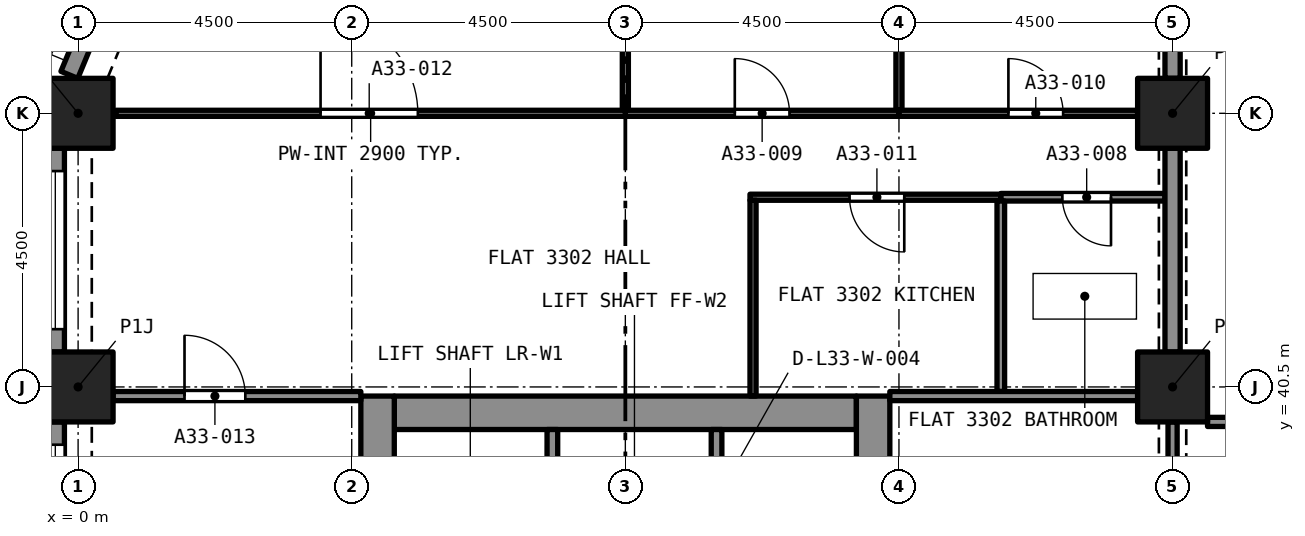
"""IFC4 building model, lengths in metres.
Left out: names, types, materials, properties, quantities, classifications, styles, units other than length and angle.
Written with IfcOpenShell. Run it as: python <this file> out.ifc"""

import sys

from ifc_helpers import new_model, si_unit, direction, frame, frame_2d, origin, origin_2d, place, context, subcontext, project, spatial, rectangle, extrude, element, fill, save


model = new_model("IFC4")
c1 = context("Model", 3, precision=1e-05, world=origin(), true_north=direction((0.0, 1.0)))
c2 = subcontext(c1, "Body", "Model", "MODEL_VIEW")
j1 = project(units=[si_unit("LENGTHUNIT", "METRE"), si_unit("PLANEANGLEUNIT", "RADIAN")], contexts=[c1])
p1 = place(None, origin())
s1 = spatial("IfcSite", under=j1, at=p1, CompositionType="ELEMENT")
p2 = place(p1, origin())
s2 = spatial("IfcBuilding", under=s1, at=p2, CompositionType="ELEMENT")
p3 = place(p2, frame((0.0, 0.0, 118.4)))
s3 = spatial("IfcBuildingStorey", under=s2, at=p3, CompositionType="ELEMENT", Elevation=118.4)
for number, where, z_axis, x_axis in (
    (1, (0.0, 40.5, 0.0), (0.0, 0.0, 1.0), (1.0, 0.0, 0.0)),
    (2, (18.0, 40.5, 0.0), (0.0, 0.0, 1.0), (1.0, 0.0, 0.0)),
    (3, (0.0, 45.0, 0.0), (0.0, 0.0, 1.0), (1.0, 0.0, 0.0)),
    (4, (18.0, 45.0, 0.0), (0.0, 0.0, 1.0), (1.0, 0.0, 0.0)),
):
    element("IfcColumn", number, at=place(p3, frame(where, z_axis=z_axis, x_axis=x_axis)), inside=s3, PredefinedType="COLUMN", context=c2, shape_type="SweptSolid", body=[
        extrude(rectangle(XDim=1.15, YDim=1.15, at=origin_2d()), origin(), (0.0, 0.0, 1.0), 3.2),
    ])
p4 = place(p3, frame((5.2, 40.075, 0.0), z_axis=(0.0, 0.0, 1.0), x_axis=(1.0, 0.0, 0.0)))
e5 = element("IfcWall", 5, at=p4, inside=s3, PredefinedType="SOLIDWALL", context=c2, shape_type="SweptSolid", body=[
    extrude(rectangle(XDim=7.6, YDim=0.55, at=frame_2d((3.8, 0.0))), origin(), (0.0, 0.0, 1.0), 3.2),
])
p5 = place(p3, frame((4.925, 27.15, 0.0), z_axis=(0.0, 0.0, 1.0), x_axis=(0.0, 1.0, 0.0)))
e6 = element("IfcWall", 6, at=p5, inside=s3, PredefinedType="SOLIDWALL", context=c2, shape_type="SweptSolid", body=[
    extrude(rectangle(XDim=13.2, YDim=0.55, at=frame_2d((6.6, 0.0))), origin(), (0.0, 0.0, 1.0), 3.2),
])
p6 = place(p5, frame((8.8, 0.0, 0.0)))
e7 = element("IfcOpeningElement", 7, at=p6, cuts=e6, PredefinedType="OPENING", context=c2, shape_type="SweptSolid", body=[
    extrude(rectangle(XDim=1.2, YDim=2.1, at=frame_2d((0.6, 1.05))), frame((0.0, 0.285, 0.0), z_axis=(0.0, -1.0, 0.0), x_axis=(1.0, 0.0, 0.0)), (0.0, 0.0, 1.0), 0.57),
])
p7 = place(p3, frame((13.075, 27.15, 0.0), z_axis=(0.0, 0.0, 1.0), x_axis=(0.0, 1.0, 0.0)))
e8 = element("IfcWall", 8, at=p7, inside=s3, PredefinedType="SOLIDWALL", context=c2, shape_type="SweptSolid", body=[
    extrude(rectangle(XDim=13.2, YDim=0.55, at=frame_2d((6.6, 0.0))), origin(), (0.0, 0.0, 1.0), 3.2),
])
p8 = place(p7, frame((10.95, 0.0, 0.0)))
e9 = element("IfcOpeningElement", 9, at=p8, cuts=e8, PredefinedType="OPENING", context=c2, shape_type="SweptSolid", body=[
    extrude(rectangle(XDim=1.1, YDim=2.1, at=frame_2d((0.55, 1.05))), frame((0.0, 0.285, 0.0), z_axis=(0.0, -1.0, 0.0), x_axis=(1.0, 0.0, 0.0)), (0.0, 0.0, 1.0), 0.57),
])
p9 = place(p7, frame((8.8, 0.0, 0.0)))
e10 = element("IfcOpeningElement", 10, at=p9, cuts=e8, PredefinedType="OPENING", context=c2, shape_type="SweptSolid", body=[
    extrude(rectangle(XDim=1.2, YDim=2.1, at=frame_2d((0.6, 1.05))), frame((0.0, 0.285, 0.0), z_axis=(0.0, -1.0, 0.0), x_axis=(1.0, 0.0, 0.0)), (0.0, 0.0, 1.0), 0.57),
])
p10 = place(p3, frame((-0.144, 45.632, 0.0), z_axis=(0.0, 0.0, 1.0), x_axis=(0.382723818695, 0.923862802911, 0.0)))
e11 = element("IfcWall", 11, at=p10, inside=s3, PredefinedType="SOLIDWALL", context=c2, shape_type="SweptSolid", body=[
    extrude(rectangle(XDim=2.164, YDim=0.3, at=frame_2d((1.082, 0.0))), origin(), (0.0, 0.0, 1.0), 3.2),
])
p11 = place(p10, frame((0.493, 0.0, 0.45)))
e12 = element("IfcOpeningElement", 12, at=p11, cuts=e11, PredefinedType="OPENING", context=c2, shape_type="SweptSolid", body=[
    extrude(rectangle(XDim=1.4, YDim=1.95, at=frame_2d((0.7, 0.975))), frame((0.0, 0.16, 0.0), z_axis=(0.0, -1.0, 0.0), x_axis=(1.0, 0.0, 0.0)), (0.0, 0.0, 1.0), 0.32),
])
p12 = place(p3, frame((-0.375, 41.075, 0.0), z_axis=(0.0, 0.0, 1.0), x_axis=(0.0, 1.0, 0.0)))
e13 = element("IfcWall", 13, at=p12, inside=s3, PredefinedType="SOLIDWALL", context=c2, shape_type="SweptSolid", body=[
    extrude(rectangle(XDim=3.35, YDim=0.3, at=frame_2d((1.675, 0.0))), origin(), (0.0, 0.0, 1.0), 3.2),
])
p13 = place(p12, frame((0.375, 0.0, 0.45)))
e14 = element("IfcOpeningElement", 14, at=p13, cuts=e13, PredefinedType="OPENING", context=c2, shape_type="SweptSolid", body=[
    extrude(rectangle(XDim=2.6, YDim=1.95, at=frame_2d((1.3, 0.975))), frame((0.0, 0.16, 0.0), z_axis=(0.0, -1.0, 0.0), x_axis=(1.0, 0.0, 0.0)), (0.0, 0.0, 1.0), 0.32),
])
p14 = place(p3, frame((-0.375, 36.575, 0.0), z_axis=(0.0, 0.0, 1.0), x_axis=(0.0, 1.0, 0.0)))
e15 = element("IfcWall", 15, at=p14, inside=s3, PredefinedType="SOLIDWALL", context=c2, shape_type="SweptSolid", body=[
    extrude(rectangle(XDim=3.35, YDim=0.3, at=frame_2d((1.675, 0.0))), origin(), (0.0, 0.0, 1.0), 3.2),
])
p15 = place(p14, frame((0.375, 0.0, 0.45)))
e16 = element("IfcOpeningElement", 16, at=p15, cuts=e15, PredefinedType="OPENING", context=c2, shape_type="SweptSolid", body=[
    extrude(rectangle(XDim=2.6, YDim=1.95, at=frame_2d((1.3, 0.975))), frame((0.0, 0.16, 0.0), z_axis=(0.0, -1.0, 0.0), x_axis=(1.0, 0.0, 0.0)), (0.0, 0.0, 1.0), 0.32),
])
p16 = place(p3, frame((17.875, 43.62, 0.0), z_axis=(0.0, 0.0, 1.0), x_axis=(-1.0, 0.0, 0.0)))
e17 = element("IfcWall", 17, at=p16, inside=s3, PredefinedType="PARTITIONING", context=c2, shape_type="SweptSolid", body=[
    extrude(rectangle(XDim=2.7, YDim=0.125, at=frame_2d((1.35, 0.0))), origin(), (0.0, 0.0, 1.0), 2.9),
])
p17 = place(p16, frame((0.888, 0.0, 0.0)))
e18 = element("IfcOpeningElement", 18, at=p17, cuts=e17, PredefinedType="OPENING", context=c2, shape_type="SweptSolid", body=[
    extrude(rectangle(XDim=0.8, YDim=2.1, at=frame_2d((0.4, 1.05))), frame((0.0, 0.073, 0.0), z_axis=(0.0, -1.0, 0.0), x_axis=(1.0, 0.0, 0.0)), (0.0, 0.0, 1.0), 0.145),
])
p18 = place(p3, frame((15.175, 40.425, 0.0), z_axis=(0.0, 0.0, 1.0), x_axis=(0.0, 1.0, 0.0)))
e19 = element("IfcWall", 19, at=p18, inside=s3, PredefinedType="PARTITIONING", context=c2, shape_type="SweptSolid", body=[
    extrude(rectangle(XDim=3.133, YDim=0.125, at=frame_2d((1.566, 0.0))), origin(), (0.0, 0.0, 1.0), 2.9),
])
p19 = place(p3, frame((18.0, 41.075, 0.0), z_axis=(0.0, 0.0, 1.0), x_axis=(0.0, 1.0, 0.0)))
e20 = element("IfcWall", 20, at=p19, inside=s3, PredefinedType="PARTITIONING", context=c2, shape_type="SweptSolid", body=[
    extrude(rectangle(XDim=3.35, YDim=0.25, at=frame_2d((1.675, 0.0))), origin(), (0.0, 0.0, 1.0), 2.38),
])
p20 = place(p3, frame((13.5, 45.05, 0.0), z_axis=(0.0, 0.0, 1.0), x_axis=(0.0, 1.0, 0.0)))
e21 = element("IfcWall", 21, at=p20, inside=s3, PredefinedType="PARTITIONING", context=c2, shape_type="SweptSolid", body=[
    extrude(rectangle(XDim=3.875, YDim=0.1, at=frame_2d((1.938, 0.0))), origin(), (0.0, 0.0, 1.0), 2.9),
])
p21 = place(p3, frame((9.0, 45.0, 0.0), z_axis=(0.0, 0.0, 1.0), x_axis=(1.0, 0.0, 0.0)))
e22 = element("IfcWall", 22, at=p21, inside=s3, PredefinedType="PARTITIONING", context=c2, shape_type="SweptSolid", body=[
    extrude(rectangle(XDim=4.5, YDim=0.1, at=frame_2d((2.25, 0.0))), origin(), (0.0, 0.0, 1.0), 2.9),
])
p22 = place(p21, frame((1.8, 0.0, 0.0)))
e23 = element("IfcOpeningElement", 23, at=p22, cuts=e22, PredefinedType="OPENING", context=c2, shape_type="SweptSolid", body=[
    extrude(rectangle(XDim=0.9, YDim=2.1, at=frame_2d((0.45, 1.05))), frame((0.0, 0.06, 0.0), z_axis=(0.0, -1.0, 0.0), x_axis=(1.0, 0.0, 0.0)), (0.0, 0.0, 1.0), 0.12),
])
p23 = place(p3, frame((9.0, 45.05, 0.0), z_axis=(0.0, 0.0, 1.0), x_axis=(0.0, 1.0, 0.0)))
e24 = element("IfcWall", 24, at=p23, inside=s3, PredefinedType="PARTITIONING", context=c2, shape_type="SweptSolid", body=[
    extrude(rectangle(XDim=3.875, YDim=0.1, at=frame_2d((1.938, 0.0))), origin(), (0.0, 0.0, 1.0), 2.9),
])
p24 = place(p3, frame((13.5, 45.0, 0.0), z_axis=(0.0, 0.0, 1.0), x_axis=(1.0, 0.0, 0.0)))
e25 = element("IfcWall", 25, at=p24, inside=s3, PredefinedType="PARTITIONING", context=c2, shape_type="SweptSolid", body=[
    extrude(rectangle(XDim=3.925, YDim=0.1, at=frame_2d((1.962, 0.0))), origin(), (0.0, 0.0, 1.0), 2.9),
])
p25 = place(p24, frame((1.8, 0.0, 0.0)))
e26 = element("IfcOpeningElement", 26, at=p25, cuts=e25, PredefinedType="OPENING", context=c2, shape_type="SweptSolid", body=[
    extrude(rectangle(XDim=0.9, YDim=2.1, at=frame_2d((0.45, 1.05))), frame((0.0, 0.06, 0.0), z_axis=(0.0, -1.0, 0.0), x_axis=(1.0, 0.0, 0.0)), (0.0, 0.0, 1.0), 0.12),
])
p26 = place(p3, frame((18.0, 45.575, 0.0), z_axis=(0.0, 0.0, 1.0), x_axis=(0.0, 1.0, 0.0)))
e27 = element("IfcWall", 27, at=p26, inside=s3, PredefinedType="PARTITIONING", context=c2, shape_type="SweptSolid", body=[
    extrude(rectangle(XDim=3.35, YDim=0.25, at=frame_2d((1.675, 0.0))), origin(), (0.0, 0.0, 1.0), 2.38),
])
p27 = place(p3, frame((15.175, 43.62, 0.0), z_axis=(0.0, 0.0, 1.0), x_axis=(-1.0, 0.0, 0.0)))
e28 = element("IfcWall", 28, at=p27, inside=s3, PredefinedType="PARTITIONING", context=c2, shape_type="SweptSolid", body=[
    extrude(rectangle(XDim=4.125, YDim=0.1, at=frame_2d((2.062, 0.0))), origin(), (0.0, 0.0, 1.0), 2.9),
])
p28 = place(p27, frame((1.587, 0.0, 0.0)))
e29 = element("IfcOpeningElement", 29, at=p28, cuts=e28, PredefinedType="OPENING", context=c2, shape_type="SweptSolid", body=[
    extrude(rectangle(XDim=0.9, YDim=2.1, at=frame_2d((0.45, 1.05))), frame((0.0, 0.06, 0.0), z_axis=(0.0, -1.0, 0.0), x_axis=(1.0, 0.0, 0.0)), (0.0, 0.0, 1.0), 0.12),
])
p29 = place(p3, frame((11.1, 40.35, 0.0), z_axis=(0.0, 0.0, 1.0), x_axis=(0.0, 1.0, 0.0)))
e30 = element("IfcWall", 30, at=p29, inside=s3, PredefinedType="PARTITIONING", context=c2, shape_type="SweptSolid", body=[
    extrude(rectangle(XDim=3.22, YDim=0.1, at=frame_2d((1.61, 0.0))), origin(), (0.0, 0.0, 1.0), 2.9),
])
p30 = place(p3, frame((0.622, 45.0, 0.0), z_axis=(0.0, 0.0, 1.0), x_axis=(1.0, 0.0, 0.0)))
e31 = element("IfcWall", 31, at=p30, inside=s3, PredefinedType="PARTITIONING", context=c2, shape_type="SweptSolid", body=[
    extrude(rectangle(XDim=8.378, YDim=0.1, at=frame_2d((4.189, 0.0))), origin(), (0.0, 0.0, 1.0), 2.9),
])
p31 = place(p30, frame((3.365, 0.0, 0.0)))
e32 = element("IfcOpeningElement", 32, at=p31, cuts=e31, PredefinedType="OPENING", context=c2, shape_type="SweptSolid", body=[
    extrude(rectangle(XDim=1.6, YDim=2.1, at=frame_2d((0.8, 1.05))), frame((0.0, 0.06, 0.0), z_axis=(0.0, -1.0, 0.0), x_axis=(1.0, 0.0, 0.0)), (0.0, 0.0, 1.0), 0.12),
])
p32 = place(p3, frame((0.575, 40.35, 0.0), z_axis=(0.0, 0.0, 1.0), x_axis=(1.0, 0.0, 0.0)))
e33 = element("IfcWall", 33, at=p32, inside=s3, PredefinedType="PARTITIONING", context=c2, shape_type="SweptSolid", body=[
    extrude(rectangle(XDim=4.075, YDim=0.15, at=frame_2d((2.038, 0.0))), origin(), (0.0, 0.0, 1.0), 2.9),
])
p33 = place(p32, frame((1.175, 0.0, 0.0)))
e34 = element("IfcOpeningElement", 34, at=p33, cuts=e33, PredefinedType="OPENING", context=c2, shape_type="SweptSolid", body=[
    extrude(rectangle(XDim=1.0, YDim=2.1, at=frame_2d((0.5, 1.05))), frame((0.0, 0.085, 0.0), z_axis=(0.0, -1.0, 0.0), x_axis=(1.0, 0.0, 0.0)), (0.0, 0.0, 1.0), 0.17),
])
p34 = place(p3, frame((13.35, 40.35, 0.0), z_axis=(0.0, 0.0, 1.0), x_axis=(1.0, 0.0, 0.0)))
e35 = element("IfcWall", 35, at=p34, inside=s3, PredefinedType="PARTITIONING", context=c2, shape_type="SweptSolid", body=[
    extrude(rectangle(XDim=4.075, YDim=0.15, at=frame_2d((2.038, 0.0))), origin(), (0.0, 0.0, 1.0), 2.9),
])
p35 = place(p3, frame((18.575, 39.925, 0.0), z_axis=(0.0, 0.0, 1.0), x_axis=(1.0, 0.0, 0.0)))
e36 = element("IfcWall", 36, at=p35, inside=s3, PredefinedType="PARTITIONING", context=c2, shape_type="SweptSolid", body=[
    extrude(rectangle(XDim=8.425, YDim=0.15, at=frame_2d((4.212, 0.0))), origin(), (0.0, 0.0, 1.0), 2.75),
])
p36 = place(p35, frame((3.425, 0.0, 0.0)))
e37 = element("IfcOpeningElement", 37, at=p36, cuts=e36, PredefinedType="OPENING", context=c2, shape_type="SweptSolid", body=[
    extrude(rectangle(XDim=1.0, YDim=2.1, at=frame_2d((0.5, 1.05))), frame((0.0, 0.085, 0.0), z_axis=(0.0, -1.0, 0.0), x_axis=(1.0, 0.0, 0.0)), (0.0, 0.0, 1.0), 0.17),
])
p37 = place(p3, frame((18.0, 39.925, 0.0), z_axis=(0.0, 0.0, 1.0), x_axis=(0.0, -1.0, 0.0)))
e38 = element("IfcWall", 38, at=p37, inside=s3, PredefinedType="PARTITIONING", context=c2, shape_type="SweptSolid", body=[
    extrude(rectangle(XDim=3.35, YDim=0.15, at=frame_2d((1.675, 0.0))), origin(), (0.0, 0.0, 1.0), 2.38),
])
p38 = place(p37, frame((1.075, 0.0, 0.0)))
e39 = element("IfcOpeningElement", 39, at=p38, cuts=e38, PredefinedType="OPENING", context=c2, shape_type="SweptSolid", body=[
    extrude(rectangle(XDim=1.2, YDim=2.1, at=frame_2d((0.6, 1.05))), frame((0.0, 0.085, 0.0), z_axis=(0.0, -1.0, 0.0), x_axis=(1.0, 0.0, 0.0)), (0.0, 0.0, 1.0), 0.17),
])
p39 = place(p3, frame((7.8, 37.5, 0.0), z_axis=(0.0, 0.0, 1.0), x_axis=(0.0, 1.0, 0.0)))
e40 = element("IfcWall", 40, at=p39, inside=s3, PredefinedType="SOLIDWALL", context=c2, shape_type="SweptSolid", body=[
    extrude(rectangle(XDim=2.3, YDim=0.175, at=frame_2d((1.15, 0.0))), origin(), (0.0, 0.0, 1.0), 2.9),
])
p40 = place(p3, frame((10.5, 37.5, 0.0), z_axis=(0.0, 0.0, 1.0), x_axis=(0.0, 1.0, 0.0)))
e41 = element("IfcWall", 41, at=p40, inside=s3, PredefinedType="SOLIDWALL", context=c2, shape_type="SweptSolid", body=[
    extrude(rectangle(XDim=2.3, YDim=0.175, at=frame_2d((1.15, 0.0))), origin(), (0.0, 0.0, 1.0), 2.9),
])
p41 = place(p40, frame((0.65, 0.0, 0.0)))
e42 = element("IfcOpeningElement", 42, at=p41, cuts=e41, PredefinedType="OPENING", context=c2, shape_type="SweptSolid", body=[
    extrude(rectangle(XDim=1.0, YDim=2.1, at=frame_2d((0.5, 1.05))), frame((0.0, 0.097, 0.0), z_axis=(0.0, -1.0, 0.0), x_axis=(1.0, 0.0, 0.0)), (0.0, 0.0, 1.0), 0.195),
])
p42 = place(p13, origin())
e43 = element("IfcWindow", 43, at=p42, inside=s3, PartitioningType="SINGLE_PANEL", PredefinedType="WINDOW", context=c2, shape_type="SweptSolid", body=[
    extrude(rectangle(XDim=2.6, YDim=1.95, at=frame_2d((1.3, 0.975))), frame((0.0, 0.03, 0.0), z_axis=(0.0, -1.0, 0.0), x_axis=(1.0, 0.0, 0.0)), (0.0, 0.0, 1.0), 0.06),
])
fill(e14, e43)
p43 = place(p15, origin())
e44 = element("IfcWindow", 44, at=p43, inside=s3, PartitioningType="SINGLE_PANEL", PredefinedType="WINDOW", context=c2, shape_type="SweptSolid", body=[
    extrude(rectangle(XDim=2.6, YDim=1.95, at=frame_2d((1.3, 0.975))), frame((0.0, 0.03, 0.0), z_axis=(0.0, -1.0, 0.0), x_axis=(1.0, 0.0, 0.0)), (0.0, 0.0, 1.0), 0.06),
])
fill(e16, e44)
p44 = place(p17, origin())
e45 = element("IfcDoor", 45, at=p44, inside=s3, OperationType="SINGLE_SWING_LEFT", PredefinedType="DOOR", context=c2, shape_type="SweptSolid", body=[
    extrude(rectangle(XDim=0.8, YDim=2.1, at=frame_2d((0.4, 1.05))), frame((0.0, 0.025, 0.0), z_axis=(0.0, -1.0, 0.0), x_axis=(1.0, 0.0, 0.0)), (0.0, 0.0, 1.0), 0.05),
])
fill(e18, e45)
p45 = place(p22, origin())
e46 = element("IfcDoor", 46, at=p45, inside=s3, OperationType="SINGLE_SWING_LEFT", PredefinedType="DOOR", context=c2, shape_type="SweptSolid", body=[
    extrude(rectangle(XDim=0.9, YDim=2.1, at=frame_2d((0.45, 1.05))), frame((0.0, 0.025, 0.0), z_axis=(0.0, -1.0, 0.0), x_axis=(1.0, 0.0, 0.0)), (0.0, 0.0, 1.0), 0.05),
])
fill(e23, e46)
p46 = place(p25, origin())
e47 = element("IfcDoor", 47, at=p46, inside=s3, OperationType="SINGLE_SWING_RIGHT", PredefinedType="DOOR", context=c2, shape_type="SweptSolid", body=[
    extrude(rectangle(XDim=0.9, YDim=2.1, at=frame_2d((0.45, 1.05))), frame((0.0, 0.025, 0.0), z_axis=(0.0, -1.0, 0.0), x_axis=(1.0, 0.0, 0.0)), (0.0, 0.0, 1.0), 0.05),
])
fill(e26, e47)
p47 = place(p28, origin())
e48 = element("IfcDoor", 48, at=p47, inside=s3, OperationType="SINGLE_SWING_LEFT", PredefinedType="DOOR", context=c2, shape_type="SweptSolid", body=[
    extrude(rectangle(XDim=0.9, YDim=2.1, at=frame_2d((0.45, 1.05))), frame((0.0, 0.025, 0.0), z_axis=(0.0, -1.0, 0.0), x_axis=(1.0, 0.0, 0.0)), (0.0, 0.0, 1.0), 0.05),
])
fill(e29, e48)
p48 = place(p31, origin())
e49 = element("IfcDoor", 49, at=p48, inside=s3, OperationType="SINGLE_SWING_LEFT", PredefinedType="DOOR", context=c2, shape_type="SweptSolid", body=[
    extrude(rectangle(XDim=1.6, YDim=2.1, at=frame_2d((0.8, 1.05))), frame((0.0, 0.025, 0.0), z_axis=(0.0, -1.0, 0.0), x_axis=(1.0, 0.0, 0.0)), (0.0, 0.0, 1.0), 0.05),
])
fill(e32, e49)
p49 = place(p33, origin())
e50 = element("IfcDoor", 50, at=p49, inside=s3, OperationType="SINGLE_SWING_LEFT", PredefinedType="DOOR", context=c2, shape_type="SweptSolid", body=[
    extrude(rectangle(XDim=1.0, YDim=2.1, at=frame_2d((0.5, 1.05))), frame((0.0, 0.025, 0.0), z_axis=(0.0, -1.0, 0.0), x_axis=(1.0, 0.0, 0.0)), (0.0, 0.0, 1.0), 0.05),
])
fill(e34, e50)
save(model, sys.argv[1])
